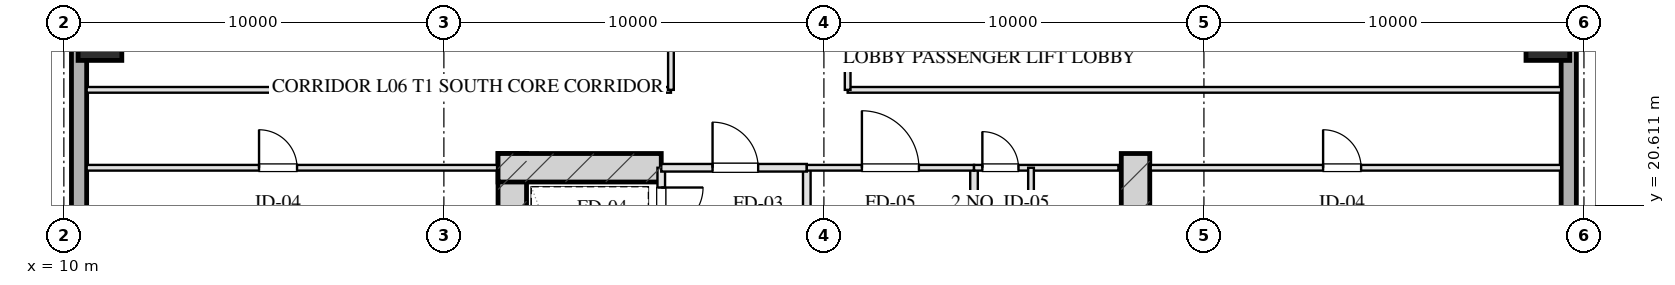
"""IFC4 building model, lengths in metres.
Left out: names, types, materials, properties, quantities, classifications, styles, units other than length and angle.
Written with IfcOpenShell. Run it as: python <this file> out.ifc"""

import sys

from ifc_helpers import new_model, si_unit, direction, frame, frame_2d, origin, origin_2d, place, context, subcontext, project, spatial, rectangle, hollow_rectangle, extrude, element, fill, save


model = new_model("IFC4")
c1 = context("Model", 3, precision=1e-05, world=origin(), true_north=direction((0.0, 1.0)))
c2 = subcontext(c1, "Body", "Model", "MODEL_VIEW")
j1 = project(units=[si_unit("LENGTHUNIT", "METRE"), si_unit("PLANEANGLEUNIT", "RADIAN")], contexts=[c1])
p1 = place(None, origin())
s1 = spatial("IfcSite", under=j1, at=p1, CompositionType="ELEMENT")
p2 = place(p1, origin())
s2 = spatial("IfcBuilding", under=s1, at=p2, CompositionType="ELEMENT")
p3 = place(p2, frame((0.0, 0.0, 30.0)))
s3 = spatial("IfcBuildingStorey", under=s2, at=p3, CompositionType="ELEMENT", Elevation=30.0)
for number, where, z_axis, x_axis in (
    (1, (21.8, 21.975, 0.0), (0.0, 0.0, 1.0), (0.0, -1.0, 0.0)),
    (2, (38.2, 21.975, 0.0), (0.0, 0.0, 1.0), (0.0, -1.0, 0.0)),
):
    element("IfcWall", number, at=place(p3, frame(where, z_axis=z_axis, x_axis=x_axis)), inside=s3, PredefinedType="SHEAR", context=c2, shape_type="SweptSolid", body=[
        extrude(rectangle(XDim=9.63, YDim=0.75, at=frame_2d((4.815, 0.0))), origin(), (0.0, 0.0, 1.0), 4.0),
    ])
p4 = place(p3, frame((21.425, 21.6, 0.0), z_axis=(0.0, 0.0, 1.0), x_axis=(1.0, 0.0, 0.0)))
e3 = element("IfcWall", 3, at=p4, inside=s3, PredefinedType="SHEAR", context=c2, shape_type="SweptSolid", body=[
    extrude(rectangle(XDim=4.295, YDim=0.75, at=frame_2d((2.147, 0.0))), origin(), (0.0, 0.0, 1.0), 4.0),
])
for number, where, z_axis, x_axis in (
    (4, (10.95, 25.0, 0.0), (0.0, 0.0, 1.0), (1.0, 0.0, 0.0)),
    (5, (49.05, 25.0, 0.0), (0.0, 0.0, 1.0), (1.0, 0.0, 0.0)),
):
    element("IfcColumn", number, at=place(p3, frame(where, z_axis=z_axis, x_axis=x_axis)), inside=s3, PredefinedType="COLUMN", context=c2, shape_type="SweptSolid", body=[
        extrude(hollow_rectangle(XDim=1.15, YDim=1.15, WallThickness=0.04, at=origin_2d()), origin(), (0.0, 0.0, 1.0), 4.001),
    ])
p5 = place(p3, frame((10.4, 7.2, 0.0), z_axis=(0.0, 0.0, 1.0), x_axis=(0.0, 1.0, 0.0)))
e6 = element("IfcWall", 6, at=p5, inside=s3, PredefinedType="SOLIDWALL", context=c2, shape_type="SweptSolid", body=[
    extrude(rectangle(XDim=53.6, YDim=0.4, at=frame_2d((26.8, 0.0))), origin(), (0.0, 0.0, 1.0), 3.16),
])
p6 = place(p5, frame((22.95, 0.0, 0.75)))
e7 = element("IfcOpeningElement", 7, at=p6, cuts=e6, PredefinedType="OPENING", context=c2, shape_type="SweptSolid", body=[
    extrude(rectangle(XDim=2.5, YDim=1.75, at=frame_2d((1.25, 0.875))), frame((0.0, 0.21, 0.0), z_axis=(0.0, -1.0, 0.0), x_axis=(1.0, 0.0, 0.0)), (0.0, 0.0, 1.0), 0.42),
])
p7 = place(p5, frame((28.15, 0.0, 0.75)))
e8 = element("IfcOpeningElement", 8, at=p7, cuts=e6, PredefinedType="OPENING", context=c2, shape_type="SweptSolid", body=[
    extrude(rectangle(XDim=2.5, YDim=1.75, at=frame_2d((1.25, 0.875))), frame((0.0, 0.21, 0.0), z_axis=(0.0, -1.0, 0.0), x_axis=(1.0, 0.0, 0.0)), (0.0, 0.0, 1.0), 0.42),
])
p8 = place(p3, frame((49.6, 60.8, 0.0), z_axis=(0.0, 0.0, 1.0), x_axis=(0.0, -1.0, 0.0)))
e9 = element("IfcWall", 9, at=p8, inside=s3, PredefinedType="SOLIDWALL", context=c2, shape_type="SweptSolid", body=[
    extrude(rectangle(XDim=53.6, YDim=0.4, at=frame_2d((26.8, 0.0))), origin(), (0.0, 0.0, 1.0), 3.16),
])
p9 = place(p8, frame((28.15, 0.0, 0.75)))
e10 = element("IfcOpeningElement", 10, at=p9, cuts=e9, PredefinedType="OPENING", context=c2, shape_type="SweptSolid", body=[
    extrude(rectangle(XDim=2.5, YDim=1.75, at=frame_2d((1.25, 0.875))), frame((0.0, 0.21, 0.0), z_axis=(0.0, -1.0, 0.0), x_axis=(1.0, 0.0, 0.0)), (0.0, 0.0, 1.0), 0.42),
])
p10 = place(p8, frame((22.95, 0.0, 0.75)))
e11 = element("IfcOpeningElement", 11, at=p10, cuts=e9, PredefinedType="OPENING", context=c2, shape_type="SweptSolid", body=[
    extrude(rectangle(XDim=2.5, YDim=1.75, at=frame_2d((1.25, 0.875))), frame((0.0, 0.21, 0.0), z_axis=(0.0, -1.0, 0.0), x_axis=(1.0, 0.0, 0.0)), (0.0, 0.0, 1.0), 0.42),
])
p11 = place(p3, frame((25.72, 21.6, 0.0), z_axis=(0.0, 0.0, 1.0), x_axis=(0.0, -1.0, 0.0)))
e12 = element("IfcWall", 12, at=p11, inside=s3, PredefinedType="PARTITIONING", context=c2, shape_type="SweptSolid", body=[
    extrude(rectangle(XDim=1.9, YDim=0.2, at=frame_2d((0.95, 0.0))), origin(), (0.0, 0.0, 1.0), 3.725),
])
p12 = place(p11, frame((0.52, 0.0, 0.0)))
e13 = element("IfcOpeningElement", 13, at=p12, cuts=e12, PredefinedType="OPENING", context=c2, shape_type="SweptSolid", body=[
    extrude(rectangle(XDim=1.1, YDim=2.05, at=frame_2d((0.55, 1.025))), frame((0.0, 0.11, 0.0), z_axis=(0.0, -1.0, 0.0), x_axis=(1.0, 0.0, 0.0)), (0.0, 0.0, 1.0), 0.22),
])
p13 = place(p3, frame((29.55, 21.6, 0.0), z_axis=(0.0, 0.0, 1.0), x_axis=(0.0, -1.0, 0.0)))
e14 = element("IfcWall", 14, at=p13, inside=s3, PredefinedType="PARTITIONING", context=c2, shape_type="SweptSolid", body=[
    extrude(rectangle(XDim=8.43, YDim=0.2, at=frame_2d((4.215, 0.0))), origin(), (0.0, 0.0, 1.0), 3.725),
])
p14 = place(p3, frame((25.72, 21.6, 0.0), z_axis=(0.0, 0.0, 1.0), x_axis=(1.0, 0.0, 0.0)))
e15 = element("IfcWall", 15, at=p14, inside=s3, PredefinedType="PARTITIONING", context=c2, shape_type="SweptSolid", body=[
    extrude(rectangle(XDim=3.83, YDim=0.2, at=frame_2d((1.915, 0.0))), origin(), (0.0, 0.0, 1.0), 3.725),
])
p15 = place(p14, frame((1.35, 0.0, 0.0)))
e16 = element("IfcOpeningElement", 16, at=p15, cuts=e15, PredefinedType="OPENING", context=c2, shape_type="SweptSolid", body=[
    extrude(rectangle(XDim=1.2, YDim=2.05, at=frame_2d((0.6, 1.025))), frame((0.0, 0.11, 0.0), z_axis=(0.0, -1.0, 0.0), x_axis=(1.0, 0.0, 0.0)), (0.0, 0.0, 1.0), 0.22),
])
p16 = place(p3, frame((33.95, 21.6, 0.0), z_axis=(0.0, 0.0, 1.0), x_axis=(0.0, -1.0, 0.0)))
e17 = element("IfcWall", 17, at=p16, inside=s3, PredefinedType="PARTITIONING", context=c2, shape_type="SweptSolid", body=[
    extrude(rectangle(XDim=8.43, YDim=0.2, at=frame_2d((4.215, 0.0))), origin(), (0.0, 0.0, 1.0), 3.725),
])
p17 = place(p3, frame((29.55, 21.6, 0.0), z_axis=(0.0, 0.0, 1.0), x_axis=(1.0, 0.0, 0.0)))
e18 = element("IfcWall", 18, at=p17, inside=s3, PredefinedType="PARTITIONING", context=c2, shape_type="SweptSolid", body=[
    extrude(rectangle(XDim=4.4, YDim=0.15, at=frame_2d((2.2, 0.0))), origin(), (0.0, 0.0, 1.0), 3.725),
])
p18 = place(p17, frame((1.45, 0.0, 0.0)))
e19 = element("IfcOpeningElement", 19, at=p18, cuts=e18, PredefinedType="OPENING", context=c2, shape_type="SweptSolid", body=[
    extrude(rectangle(XDim=1.5, YDim=2.05, at=frame_2d((0.75, 1.025))), frame((0.0, 0.085, 0.0), z_axis=(0.0, -1.0, 0.0), x_axis=(1.0, 0.0, 0.0)), (0.0, 0.0, 1.0), 0.17),
])
p19 = place(p3, frame((33.95, 21.6, 0.0), z_axis=(0.0, 0.0, 1.0), x_axis=(1.0, 0.0, 0.0)))
e20 = element("IfcWall", 20, at=p19, inside=s3, PredefinedType="PARTITIONING", context=c2, shape_type="SweptSolid", body=[
    extrude(rectangle(XDim=3.8, YDim=0.15, at=frame_2d((1.9, 0.0))), origin(), (0.0, 0.0, 1.0), 3.725),
])
p20 = place(p19, frame((0.22, 0.0, 0.0)))
e21 = element("IfcOpeningElement", 21, at=p20, cuts=e20, PredefinedType="OPENING", context=c2, shape_type="SweptSolid", body=[
    extrude(rectangle(XDim=0.95, YDim=2.05, at=frame_2d((0.475, 1.025))), frame((0.0, 0.085, 0.0), z_axis=(0.0, -1.0, 0.0), x_axis=(1.0, 0.0, 0.0)), (0.0, 0.0, 1.0), 0.17),
])
p21 = place(p3, frame((35.45, 21.6, 0.0), z_axis=(0.0, 0.0, 1.0), x_axis=(0.0, -1.0, 0.0)))
e22 = element("IfcWall", 22, at=p21, inside=s3, PredefinedType="PARTITIONING", context=c2, shape_type="SweptSolid", body=[
    extrude(rectangle(XDim=8.43, YDim=0.15, at=frame_2d((4.215, 0.0))), origin(), (0.0, 0.0, 1.0), 3.315),
])
p22 = place(p21, frame((2.55, 0.0, 0.0)))
e23 = element("IfcOpeningElement", 23, at=p22, cuts=e22, PredefinedType="OPENING", context=c2, shape_type="SweptSolid", body=[
    extrude(rectangle(XDim=0.95, YDim=2.05, at=frame_2d((0.475, 1.025))), frame((0.0, 0.085, 0.0), z_axis=(0.0, -1.0, 0.0), x_axis=(1.0, 0.0, 0.0)), (0.0, 0.0, 1.0), 0.17),
])
p23 = place(p21, frame((5.8, 0.0, 0.0)))
e24 = element("IfcOpeningElement", 24, at=p23, cuts=e22, PredefinedType="OPENING", context=c2, shape_type="SweptSolid", body=[
    extrude(rectangle(XDim=0.9, YDim=2.05, at=frame_2d((0.45, 1.025))), frame((0.0, 0.085, 0.0), z_axis=(0.0, -1.0, 0.0), x_axis=(1.0, 0.0, 0.0)), (0.0, 0.0, 1.0), 0.17),
])
p24 = place(p3, frame((10.6, 21.6, 0.0), z_axis=(0.0, 0.0, 1.0), x_axis=(1.0, 0.0, 0.0)))
e25 = element("IfcWall", 25, at=p24, inside=s3, PredefinedType="PARTITIONING", context=c2, shape_type="SweptSolid", body=[
    extrude(rectangle(XDim=10.8, YDim=0.15, at=frame_2d((5.4, 0.0))), origin(), (0.0, 0.0, 1.0), 3.725),
])
p25 = place(p24, frame((4.536, 0.0, 0.0)))
e26 = element("IfcOpeningElement", 26, at=p25, cuts=e25, PredefinedType="OPENING", context=c2, shape_type="SweptSolid", body=[
    extrude(rectangle(XDim=1.0, YDim=2.05, at=frame_2d((0.5, 1.025))), frame((0.0, 0.085, 0.0), z_axis=(0.0, -1.0, 0.0), x_axis=(1.0, 0.0, 0.0)), (0.0, 0.0, 1.0), 0.17),
])
p26 = place(p3, frame((38.6, 21.6, 0.0), z_axis=(0.0, 0.0, 1.0), x_axis=(1.0, 0.0, 0.0)))
e27 = element("IfcWall", 27, at=p26, inside=s3, PredefinedType="PARTITIONING", context=c2, shape_type="SweptSolid", body=[
    extrude(rectangle(XDim=10.8, YDim=0.15, at=frame_2d((5.4, 0.0))), origin(), (0.0, 0.0, 1.0), 3.725),
])
p27 = place(p26, frame((4.536, 0.0, 0.0)))
e28 = element("IfcOpeningElement", 28, at=p27, cuts=e27, PredefinedType="OPENING", context=c2, shape_type="SweptSolid", body=[
    extrude(rectangle(XDim=1.0, YDim=2.05, at=frame_2d((0.5, 1.025))), frame((0.0, 0.085, 0.0), z_axis=(0.0, -1.0, 0.0), x_axis=(1.0, 0.0, 0.0)), (0.0, 0.0, 1.0), 0.17),
])
p28 = place(p3, frame((10.6, 23.65, 0.0), z_axis=(0.0, 0.0, 1.0), x_axis=(1.0, 0.0, 0.0)))
e29 = element("IfcWall", 29, at=p28, inside=s3, PredefinedType="PARTITIONING", context=c2, shape_type="SweptSolid", body=[
    extrude(rectangle(XDim=15.375, YDim=0.15, at=frame_2d((7.688, 0.0))), origin(), (0.0, 0.0, 1.0), 3.725),
])
p29 = place(p3, frame((30.625, 23.65, 0.0), z_axis=(0.0, 0.0, 1.0), x_axis=(1.0, 0.0, 0.0)))
e30 = element("IfcWall", 30, at=p29, inside=s3, PredefinedType="PARTITIONING", context=c2, shape_type="SweptSolid", body=[
    extrude(rectangle(XDim=18.775, YDim=0.15, at=frame_2d((9.387, 0.0))), origin(), (0.0, 0.0, 1.0), 3.725),
])
p30 = place(p3, frame((25.975, 23.65, 0.0), z_axis=(0.0, 0.0, 1.0), x_axis=(0.0, 1.0, 0.0)))
e31 = element("IfcWall", 31, at=p30, inside=s3, PredefinedType="PARTITIONING", context=c2, shape_type="SweptSolid", body=[
    extrude(rectangle(XDim=20.7, YDim=0.15, at=frame_2d((10.35, 0.0))), origin(), (0.0, 0.0, 1.0), 3.725),
])
p31 = place(p30, frame((2.175, 0.0, 0.0)))
e32 = element("IfcOpeningElement", 32, at=p31, cuts=e31, PredefinedType="OPENING", context=c2, shape_type="SweptSolid", body=[
    extrude(rectangle(XDim=1.05, YDim=2.05, at=frame_2d((0.525, 1.025))), frame((0.0, 0.085, 0.0), z_axis=(0.0, -1.0, 0.0), x_axis=(1.0, 0.0, 0.0)), (0.0, 0.0, 1.0), 0.17),
])
p32 = place(p30, frame((7.69, 0.0, 0.0)))
e33 = element("IfcOpeningElement", 33, at=p32, cuts=e31, PredefinedType="OPENING", context=c2, shape_type="SweptSolid", body=[
    extrude(rectangle(XDim=1.0, YDim=2.05, at=frame_2d((0.5, 1.025))), frame((0.0, 0.085, 0.0), z_axis=(0.0, -1.0, 0.0), x_axis=(1.0, 0.0, 0.0)), (0.0, 0.0, 1.0), 0.17),
])
p33 = place(p30, frame((12.69, 0.0, 0.0)))
e34 = element("IfcOpeningElement", 34, at=p33, cuts=e31, PredefinedType="OPENING", context=c2, shape_type="SweptSolid", body=[
    extrude(rectangle(XDim=1.0, YDim=2.05, at=frame_2d((0.5, 1.025))), frame((0.0, 0.085, 0.0), z_axis=(0.0, -1.0, 0.0), x_axis=(1.0, 0.0, 0.0)), (0.0, 0.0, 1.0), 0.17),
])
p34 = place(p30, frame((17.525, 0.0, 0.0)))
e35 = element("IfcOpeningElement", 35, at=p34, cuts=e31, PredefinedType="OPENING", context=c2, shape_type="SweptSolid", body=[
    extrude(rectangle(XDim=0.85, YDim=2.05, at=frame_2d((0.425, 1.025))), frame((0.0, 0.085, 0.0), z_axis=(0.0, -1.0, 0.0), x_axis=(1.0, 0.0, 0.0)), (0.0, 0.0, 1.0), 0.17),
])
p35 = place(p3, frame((30.625, 23.65, 0.0), z_axis=(0.0, 0.0, 1.0), x_axis=(0.0, 1.0, 0.0)))
e36 = element("IfcWall", 36, at=p35, inside=s3, PredefinedType="PARTITIONING", context=c2, shape_type="SweptSolid", body=[
    extrude(rectangle(XDim=20.7, YDim=0.15, at=frame_2d((10.35, 0.0))), origin(), (0.0, 0.0, 1.0), 3.725),
])
p36 = place(p35, frame((2.191, 0.0, 0.0)))
e37 = element("IfcOpeningElement", 37, at=p36, cuts=e36, PredefinedType="OPENING", context=c2, shape_type="SweptSolid", body=[
    extrude(rectangle(XDim=1.0, YDim=2.05, at=frame_2d((0.5, 1.025))), frame((0.0, 0.085, 0.0), z_axis=(0.0, -1.0, 0.0), x_axis=(1.0, 0.0, 0.0)), (0.0, 0.0, 1.0), 0.17),
])
p37 = place(p35, frame((7.78, 0.0, 0.0)))
e38 = element("IfcOpeningElement", 38, at=p37, cuts=e36, PredefinedType="OPENING", context=c2, shape_type="SweptSolid", body=[
    extrude(rectangle(XDim=1.0, YDim=2.05, at=frame_2d((0.5, 1.025))), frame((0.0, 0.085, 0.0), z_axis=(0.0, -1.0, 0.0), x_axis=(1.0, 0.0, 0.0)), (0.0, 0.0, 1.0), 0.17),
])
p38 = place(p35, frame((12.764, 0.0, 0.0)))
e39 = element("IfcOpeningElement", 39, at=p38, cuts=e36, PredefinedType="OPENING", context=c2, shape_type="SweptSolid", body=[
    extrude(rectangle(XDim=1.0, YDim=2.05, at=frame_2d((0.5, 1.025))), frame((0.0, 0.085, 0.0), z_axis=(0.0, -1.0, 0.0), x_axis=(1.0, 0.0, 0.0)), (0.0, 0.0, 1.0), 0.17),
])
p39 = place(p35, frame((17.525, 0.0, 0.0)))
e40 = element("IfcOpeningElement", 40, at=p39, cuts=e36, PredefinedType="OPENING", context=c2, shape_type="SweptSolid", body=[
    extrude(rectangle(XDim=1.05, YDim=2.05, at=frame_2d((0.525, 1.025))), frame((0.0, 0.085, 0.0), z_axis=(0.0, -1.0, 0.0), x_axis=(1.0, 0.0, 0.0)), (0.0, 0.0, 1.0), 0.17),
])
p40 = place(p12, origin())
e41 = element("IfcDoor", 41, at=p40, inside=s3, OperationType="SINGLE_SWING_LEFT", PredefinedType="DOOR", context=c2, shape_type="SweptSolid", body=[
    extrude(rectangle(XDim=1.1, YDim=2.05, at=frame_2d((0.55, 1.025))), frame((0.0, 0.025, 0.0), z_axis=(0.0, -1.0, 0.0), x_axis=(1.0, 0.0, 0.0)), (0.0, 0.0, 1.0), 0.05),
])
fill(e13, e41)
p41 = place(p15, origin())
e42 = element("IfcDoor", 42, at=p41, inside=s3, OperationType="SINGLE_SWING_LEFT", PredefinedType="DOOR", context=c2, shape_type="SweptSolid", body=[
    extrude(rectangle(XDim=1.2, YDim=2.05, at=frame_2d((0.6, 1.025))), frame((0.0, 0.025, 0.0), z_axis=(0.0, -1.0, 0.0), x_axis=(1.0, 0.0, 0.0)), (0.0, 0.0, 1.0), 0.05),
])
fill(e16, e42)
p42 = place(p18, origin())
e43 = element("IfcDoor", 43, at=p42, inside=s3, OperationType="SINGLE_SWING_LEFT", PredefinedType="DOOR", context=c2, shape_type="SweptSolid", body=[
    extrude(rectangle(XDim=1.5, YDim=2.05, at=frame_2d((0.75, 1.025))), frame((0.0, 0.025, 0.0), z_axis=(0.0, -1.0, 0.0), x_axis=(1.0, 0.0, 0.0)), (0.0, 0.0, 1.0), 0.05),
])
fill(e19, e43)
p43 = place(p20, origin())
e44 = element("IfcDoor", 44, at=p43, inside=s3, OperationType="SINGLE_SWING_LEFT", PredefinedType="DOOR", context=c2, shape_type="SweptSolid", body=[
    extrude(rectangle(XDim=0.95, YDim=2.05, at=frame_2d((0.475, 1.025))), frame((0.0, 0.025, 0.0), z_axis=(0.0, -1.0, 0.0), x_axis=(1.0, 0.0, 0.0)), (0.0, 0.0, 1.0), 0.05),
])
fill(e21, e44)
p44 = place(p25, origin())
e45 = element("IfcDoor", 45, at=p44, inside=s3, OperationType="SINGLE_SWING_LEFT", PredefinedType="DOOR", context=c2, shape_type="SweptSolid", body=[
    extrude(rectangle(XDim=1.0, YDim=2.05, at=frame_2d((0.5, 1.025))), frame((0.0, 0.025, 0.0), z_axis=(0.0, -1.0, 0.0), x_axis=(1.0, 0.0, 0.0)), (0.0, 0.0, 1.0), 0.05),
])
fill(e26, e45)
p45 = place(p27, origin())
e46 = element("IfcDoor", 46, at=p45, inside=s3, OperationType="SINGLE_SWING_LEFT", PredefinedType="DOOR", context=c2, shape_type="SweptSolid", body=[
    extrude(rectangle(XDim=1.0, YDim=2.05, at=frame_2d((0.5, 1.025))), frame((0.0, 0.025, 0.0), z_axis=(0.0, -1.0, 0.0), x_axis=(1.0, 0.0, 0.0)), (0.0, 0.0, 1.0), 0.05),
])
fill(e28, e46)
save(model, sys.argv[1])
